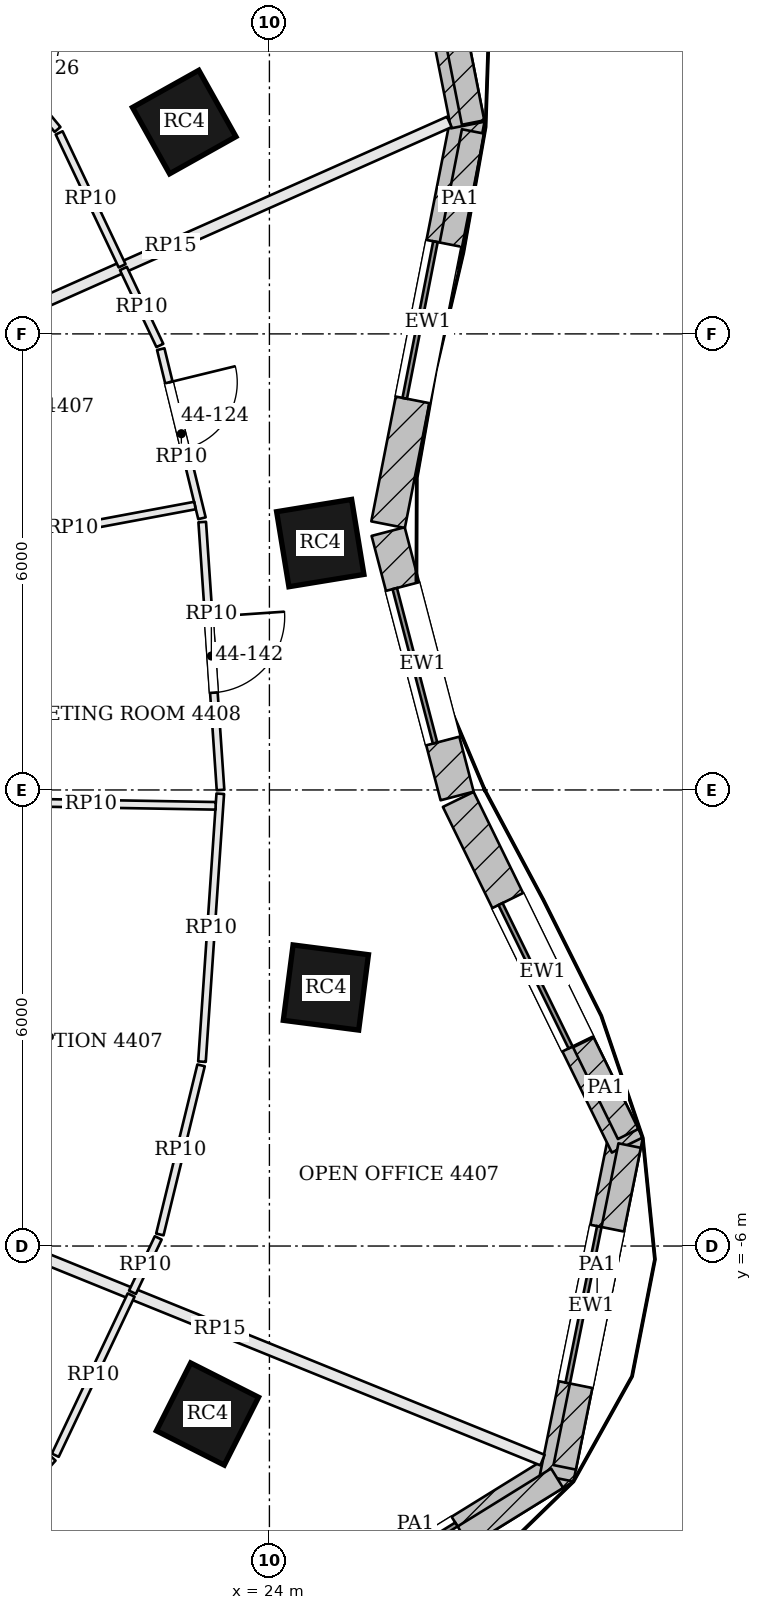
"""IFC4 building model, lengths in metres.
Left out: names, types, materials, properties, quantities, classifications, styles, units other than length and angle.
Written with IfcOpenShell. Run it as: python <this file> out.ifc"""

import sys

from ifc_helpers import new_model, si_unit, direction, frame, frame_2d, origin, origin_2d, place, context, subcontext, project, spatial, rectangle, extrude, element, fill, save


model = new_model("IFC4")
c1 = context("Model", 3, precision=1e-05, world=origin(), true_north=direction((0.0, 1.0)))
c2 = subcontext(c1, "Body", "Model", "MODEL_VIEW")
j1 = project(units=[si_unit("LENGTHUNIT", "METRE"), si_unit("PLANEANGLEUNIT", "RADIAN")], contexts=[c1])
p1 = place(None, origin())
s1 = spatial("IfcSite", under=j1, at=p1, CompositionType="ELEMENT")
p2 = place(p1, origin())
s2 = spatial("IfcBuilding", under=s1, at=p2, CompositionType="ELEMENT")
p3 = place(p2, frame((0.0, 0.0, 181.8)))
s3 = spatial("IfcBuildingStorey", under=s2, at=p3, CompositionType="ELEMENT", Elevation=181.8)
for number, where, z_axis, x_axis in (
    (1, (24.669, 3.248, 0.0), (0.0, 0.0, 1.0), (-0.162, 0.987, 0.0)),
    (2, (22.879, 8.787, 0.0), (0.0, 0.0, 1.0), (-0.489, 0.873, 0.0)),
    (3, (23.185, -8.21, 0.0), (0.0, 0.0, 1.0), (0.451, 0.893, 0.0)),
    (4, (24.743, -2.599, 0.0), (0.0, 0.0, 1.0), (0.128, 0.992, 0.0)),
):
    element("IfcColumn", number, at=place(p3, frame(where, z_axis=z_axis, x_axis=x_axis)), inside=s3, PredefinedType="COLUMN", context=c2, shape_type="SweptSolid", body=[
        extrude(rectangle(XDim=1.0, YDim=1.0, at=origin_2d()), origin(), (0.0, 0.0, 1.0), 3.9),
    ])
p4 = place(p3, frame((26.469, -0.079, 0.0), z_axis=(0.0, 0.0, 1.0), x_axis=(-0.252446779859, 0.967610780913, 0.0)))
e5 = element("IfcWall", 5, at=p4, inside=s3, PredefinedType="SOLIDWALL", context=c2, shape_type="SweptSolid", body=[
    extrude(rectangle(XDim=3.595, YDim=0.45, at=frame_2d((1.797, 0.0))), origin(), (0.0, 0.0, 1.0), 3.7),
])
p5 = place(p4, frame((0.747, 0.0, 0.9)))
e6 = element("IfcOpeningElement", 6, at=p5, cuts=e5, PredefinedType="OPENING", context=c2, shape_type="SweptSolid", body=[
    extrude(rectangle(XDim=2.1, YDim=2.3, at=frame_2d((1.05, 1.15))), frame((0.0, 0.235, 0.0), z_axis=(0.0, -1.0, 0.0), x_axis=(1.0, 0.0, 0.0)), (0.0, 0.0, 1.0), 0.47),
])
p6 = place(p3, frame((25.561, 3.49, 0.0), z_axis=(0.0, 0.0, 1.0), x_axis=(0.192494026297, 0.981298145234, 0.0)))
e7 = element("IfcWall", 7, at=p6, inside=s3, PredefinedType="SOLIDWALL", context=c2, shape_type="SweptSolid", body=[
    extrude(rectangle(XDim=5.446, YDim=0.45, at=frame_2d((2.723, 0.0))), origin(), (0.0, 0.0, 1.0), 3.7),
])
p7 = place(p6, frame((1.673, 0.0, 0.9)))
e8 = element("IfcOpeningElement", 8, at=p7, cuts=e7, PredefinedType="OPENING", context=c2, shape_type="SweptSolid", body=[
    extrude(rectangle(XDim=2.1, YDim=2.3, at=frame_2d((1.05, 1.15))), frame((0.0, 0.235, 0.0), z_axis=(0.0, -1.0, 0.0), x_axis=(1.0, 0.0, 0.0)), (0.0, 0.0, 1.0), 0.47),
])
p8 = place(p3, frame((26.61, 8.748, 0.0), z_axis=(0.0, 0.0, 1.0), x_axis=(-0.193923166402, 0.981016720312, 0.0)))
e9 = element("IfcWall", 9, at=p8, inside=s3, PredefinedType="SOLIDWALL", context=c2, shape_type="SweptSolid", body=[
    extrude(rectangle(XDim=4.518, YDim=0.45, at=frame_2d((2.259, 0.0))), origin(), (0.0, 0.0, 1.0), 3.7),
])
p9 = place(p8, frame((1.209, 0.0, 0.9)))
e10 = element("IfcOpeningElement", 10, at=p9, cuts=e9, PredefinedType="OPENING", context=c2, shape_type="SweptSolid", body=[
    extrude(rectangle(XDim=2.1, YDim=2.3, at=frame_2d((1.05, 1.15))), frame((0.0, 0.235, 0.0), z_axis=(0.0, -1.0, 0.0), x_axis=(1.0, 0.0, 0.0)), (0.0, 0.0, 1.0), 0.47),
])
p10 = place(p3, frame((23.368, -11.701, 0.0), z_axis=(0.0, 0.0, 1.0), x_axis=(0.850251408633, 0.526376806211, 0.0)))
e11 = element("IfcWall", 11, at=p10, inside=s3, PredefinedType="SOLIDWALL", context=c2, shape_type="SweptSolid", body=[
    extrude(rectangle(XDim=5.302, YDim=0.45, at=frame_2d((2.651, 0.0))), origin(), (0.0, 0.0, 1.0), 3.7),
])
p11 = place(p10, frame((1.601, 0.0, 0.9)))
e12 = element("IfcOpeningElement", 12, at=p11, cuts=e11, PredefinedType="OPENING", context=c2, shape_type="SweptSolid", body=[
    extrude(rectangle(XDim=2.1, YDim=2.3, at=frame_2d((1.05, 1.15))), frame((0.0, 0.235, 0.0), z_axis=(0.0, -1.0, 0.0), x_axis=(1.0, 0.0, 0.0)), (0.0, 0.0, 1.0), 0.47),
])
p12 = place(p3, frame((27.78, -9.053, 0.0), z_axis=(0.0, 0.0, 1.0), x_axis=(0.197796229105, 0.980243159503, 0.0)))
e13 = element("IfcWall", 13, at=p12, inside=s3, PredefinedType="SOLIDWALL", context=c2, shape_type="SweptSolid", body=[
    extrude(rectangle(XDim=4.61, YDim=0.45, at=frame_2d((2.305, 0.0))), origin(), (0.0, 0.0, 1.0), 3.7),
])
p13 = place(p12, frame((1.255, 0.0, 0.9)))
e14 = element("IfcOpeningElement", 14, at=p13, cuts=e13, PredefinedType="OPENING", context=c2, shape_type="SweptSolid", body=[
    extrude(rectangle(XDim=2.1, YDim=2.3, at=frame_2d((1.05, 1.15))), frame((0.0, 0.235, 0.0), z_axis=(0.0, -1.0, 0.0), x_axis=(1.0, 0.0, 0.0)), (0.0, 0.0, 1.0), 0.47),
])
p14 = place(p3, frame((28.707, -4.672, 0.0), z_axis=(0.0, 0.0, 1.0), x_axis=(-0.439053549989, 0.898460895221, 0.0)))
e15 = element("IfcWall", 15, at=p14, inside=s3, PredefinedType="SOLIDWALL", context=c2, shape_type="SweptSolid", body=[
    extrude(rectangle(XDim=5.062, YDim=0.45, at=frame_2d((2.531, 0.0))), origin(), (0.0, 0.0, 1.0), 3.7),
])
p15 = place(p14, frame((1.481, 0.0, 0.9)))
e16 = element("IfcOpeningElement", 16, at=p15, cuts=e15, PredefinedType="OPENING", context=c2, shape_type="SweptSolid", body=[
    extrude(rectangle(XDim=2.1, YDim=2.3, at=frame_2d((1.05, 1.15))), frame((0.0, 0.235, 0.0), z_axis=(0.0, -1.0, 0.0), x_axis=(1.0, 0.0, 0.0)), (0.0, 0.0, 1.0), 0.47),
])
p16 = place(p3, frame((26.332, 6.889, 3.9), z_axis=(0.0, 0.0, 1.0), x_axis=(0.192480725658, 0.981300754229, 0.0)))
e17 = element("IfcWall", 17, at=p16, inside=s3, PredefinedType="PARAPET", context=c2, shape_type="SweptSolid", body=[
    extrude(rectangle(XDim=1.809, YDim=0.3, at=frame_2d((0.904, 0.0))), origin(), (0.0, 0.0, 1.0), 1.1),
])
p17 = place(p3, frame((26.68, 8.78, 3.9), z_axis=(0.0, 0.0, 1.0), x_axis=(-0.193937094138, 0.981013967035, 0.0)))
e18 = element("IfcWall", 18, at=p17, inside=s3, PredefinedType="PARAPET", context=c2, shape_type="SweptSolid", body=[
    extrude(rectangle(XDim=4.332, YDim=0.3, at=frame_2d((2.166, 0.0))), origin(), (0.0, 0.0, 1.0), 1.1),
])
p18 = place(p3, frame((24.057, -11.363, 3.9), z_axis=(0.0, 0.0, 1.0), x_axis=(0.85023666639, 0.526400618471, 0.0)))
e19 = element("IfcWall", 19, at=p18, inside=s3, PredefinedType="PARAPET", context=c2, shape_type="SweptSolid", body=[
    extrude(rectangle(XDim=4.385, YDim=0.3, at=frame_2d((2.192, 0.0))), origin(), (0.0, 0.0, 1.0), 1.1),
])
p19 = place(p3, frame((27.885, -8.912, 3.9), z_axis=(0.0, 0.0, 1.0), x_axis=(0.197855213088, 0.980231255701, 0.0)))
e20 = element("IfcWall", 20, at=p19, inside=s3, PredefinedType="PARAPET", context=c2, shape_type="SweptSolid", body=[
    extrude(rectangle(XDim=4.319, YDim=0.3, at=frame_2d((2.159, 0.0))), origin(), (0.0, 0.0, 1.0), 1.1),
])
p20 = place(p3, frame((28.719, -4.526, 3.9), z_axis=(0.0, 0.0, 1.0), x_axis=(-0.439122076977, 0.898427404697, 0.0)))
e21 = element("IfcWall", 21, at=p20, inside=s3, PredefinedType="PARAPET", context=c2, shape_type="SweptSolid", body=[
    extrude(rectangle(XDim=1.343, YDim=0.3, at=frame_2d((0.671, 0.0))), origin(), (0.0, 0.0, 1.0), 1.1),
])
p21 = place(p3, frame((21.493, 15.114, 0.0), z_axis=(0.0, 0.0, 1.0), x_axis=(-0.659778549164, -0.751460089467, 0.0)))
e22 = element("IfcWall", 22, at=p21, inside=s3, PredefinedType="PARTITIONING", context=c2, shape_type="SweptSolid", body=[
    extrude(rectangle(XDim=7.877, YDim=0.15, at=frame_2d((3.938, 0.0))), origin(), (0.0, 0.0, 1.0), 3.234),
])
p22 = place(p3, frame((27.593, -8.816, 0.0), z_axis=(0.0, 0.0, 1.0), x_axis=(-0.9267854071, 0.375591279433, 0.0)))
e23 = element("IfcWall", 23, at=p22, inside=s3, PredefinedType="PARTITIONING", context=c2, shape_type="SweptSolid", body=[
    extrude(rectangle(XDim=9.161, YDim=0.15, at=frame_2d((4.58, 0.0))), origin(), (0.0, 0.0, 1.0), 3.234),
])
p23 = place(p3, frame((26.367, 8.789, 0.0), z_axis=(0.0, 0.0, 1.0), x_axis=(-0.913673557468, -0.406448804137, 0.0)))
e24 = element("IfcWall", 24, at=p23, inside=s3, PredefinedType="PARTITIONING", context=c2, shape_type="SweptSolid", body=[
    extrude(rectangle(XDim=8.029, YDim=0.15, at=frame_2d((4.014, 0.0))), origin(), (0.0, 0.0, 1.0), 3.234),
])
p24 = place(p3, frame((22.181, -6.645, 0.0), z_axis=(0.0, 0.0, 1.0), x_axis=(-0.428144841987, -0.903710127353, 0.0)))
e25 = element("IfcWall", 25, at=p24, inside=s3, PredefinedType="PARTITIONING", context=c2, shape_type="SweptSolid", body=[
    extrude(rectangle(XDim=2.332, YDim=0.1, at=frame_2d((1.166, 0.0))), origin(), (0.0, 0.0, 1.0), 3.084),
])
p25 = place(p3, frame((21.149, -8.789, 0.0), z_axis=(0.0, 0.0, 1.0), x_axis=(-0.666915902537, -0.745132994132, 0.0)))
e26 = element("IfcWall", 26, at=p25, inside=s3, PredefinedType="PARTITIONING", context=c2, shape_type="SweptSolid", body=[
    extrude(rectangle(XDim=4.186, YDim=0.1, at=frame_2d((2.093, 0.0))), origin(), (0.0, 0.0, 1.0), 3.084),
])
p26 = place(p25, frame((1.869, 0.0, 0.0)))
e27 = element("IfcOpeningElement", 27, at=p26, cuts=e26, PredefinedType="OPENING", context=c2, shape_type="SweptSolid", body=[
    extrude(rectangle(XDim=0.9, YDim=2.1, at=frame_2d((0.45, 1.05))), frame((0.0, 0.06, 0.0), z_axis=(0.0, -1.0, 0.0), x_axis=(1.0, 0.0, 0.0)), (0.0, 0.0, 1.0), 0.12),
])
p27 = place(p3, frame((22.079, 6.86, 0.0), z_axis=(0.0, 0.0, 1.0), x_axis=(0.428105084675, -0.903728961844, 0.0)))
e28 = element("IfcWall", 28, at=p27, inside=s3, PredefinedType="PARTITIONING", context=c2, shape_type="SweptSolid", body=[
    extrude(rectangle(XDim=1.12, YDim=0.1, at=frame_2d((0.56, 0.0))), origin(), (0.0, 0.0, 1.0), 3.084),
])
p28 = place(p3, frame((22.57, 5.799, 0.0), z_axis=(0.0, 0.0, 1.0), x_axis=(0.236811358433, -0.971555649727, 0.0)))
e29 = element("IfcWall", 29, at=p28, inside=s3, PredefinedType="PARTITIONING", context=c2, shape_type="SweptSolid", body=[
    extrude(rectangle(XDim=2.29, YDim=0.1, at=frame_2d((1.145, 0.0))), origin(), (0.0, 0.0, 1.0), 3.084),
])
p29 = place(p28, frame((0.45, 0.0, 0.0)))
e30 = element("IfcOpeningElement", 30, at=p29, cuts=e29, PredefinedType="OPENING", context=c2, shape_type="SweptSolid", body=[
    extrude(rectangle(XDim=0.9, YDim=2.1, at=frame_2d((0.45, 1.05))), frame((0.0, 0.06, 0.0), z_axis=(0.0, -1.0, 0.0), x_axis=(1.0, 0.0, 0.0)), (0.0, 0.0, 1.0), 0.12),
])
p30 = place(p3, frame((23.116, 3.525, 0.0), z_axis=(0.0, 0.0, 1.0), x_axis=(0.068138009452, -0.997675905125, 0.0)))
e31 = element("IfcWall", 31, at=p30, inside=s3, PredefinedType="PARTITIONING", context=c2, shape_type="SweptSolid", body=[
    extrude(rectangle(XDim=3.533, YDim=0.1, at=frame_2d((1.767, 0.0))), origin(), (0.0, 0.0, 1.0), 3.084),
])
p31 = place(p30, frame((1.25, 0.0, 0.0)))
e32 = element("IfcOpeningElement", 32, at=p31, cuts=e31, PredefinedType="OPENING", context=c2, shape_type="SweptSolid", body=[
    extrude(rectangle(XDim=1.0, YDim=2.4, at=frame_2d((0.5, 1.2))), frame((0.0, 0.06, 0.0), z_axis=(0.0, -1.0, 0.0), x_axis=(1.0, 0.0, 0.0)), (0.0, 0.0, 1.0), 0.12),
])
p32 = place(p3, frame((23.354, -0.05, 0.0), z_axis=(0.0, 0.0, 1.0), x_axis=(-0.06820679361, -0.99767120501, 0.0)))
e33 = element("IfcWall", 33, at=p32, inside=s3, PredefinedType="PARTITIONING", context=c2, shape_type="SweptSolid", body=[
    extrude(rectangle(XDim=3.533, YDim=0.1, at=frame_2d((1.767, 0.0))), origin(), (0.0, 0.0, 1.0), 3.084),
])
p33 = place(p3, frame((23.101, -3.623, 0.0), z_axis=(0.0, 0.0, 1.0), x_axis=(-0.236811358433, -0.971555649727, 0.0)))
e34 = element("IfcWall", 34, at=p33, inside=s3, PredefinedType="PARTITIONING", context=c2, shape_type="SweptSolid", body=[
    extrude(rectangle(XDim=2.29, YDim=0.1, at=frame_2d((1.145, 0.0))), origin(), (0.0, 0.0, 1.0), 3.084),
])
p34 = place(p3, frame((22.537, -5.893, 0.0), z_axis=(0.0, 0.0, 1.0), x_axis=(-0.427993557618, -0.903781784856, 0.0)))
e35 = element("IfcWall", 35, at=p34, inside=s3, PredefinedType="PARTITIONING", context=c2, shape_type="SweptSolid", body=[
    extrude(rectangle(XDim=0.792, YDim=0.1, at=frame_2d((0.396, 0.0))), origin(), (0.0, 0.0, 1.0), 3.084),
])
p35 = place(p3, frame((20.013, -0.153, 0.0), z_axis=(0.0, 0.0, 1.0), x_axis=(0.999854678593, -0.017047630214, 0.0)))
e36 = element("IfcWall", 36, at=p35, inside=s3, PredefinedType="PARTITIONING", context=c2, shape_type="SweptSolid", body=[
    extrude(rectangle(XDim=3.28, YDim=0.1, at=frame_2d((1.64, 0.0))), origin(), (0.0, 0.0, 1.0), 3.084),
])
p36 = place(p3, frame((19.796, 3.14, 0.0), z_axis=(0.0, 0.0, 1.0), x_axis=(0.983010938824, 0.183546980778, 0.0)))
e37 = element("IfcWall", 37, at=p36, inside=s3, PredefinedType="PARTITIONING", context=c2, shape_type="SweptSolid", body=[
    extrude(rectangle(XDim=3.28, YDim=0.1, at=frame_2d((1.64, 0.0))), origin(), (0.0, 0.0, 1.0), 3.084),
])
p37 = place(p3, frame((19.206, 11.121, 0.0), z_axis=(0.0, 0.0, 1.0), x_axis=(0.636597206989, -0.771196470462, 0.0)))
e38 = element("IfcWall", 38, at=p37, inside=s3, PredefinedType="PARTITIONING", context=c2, shape_type="SweptSolid", body=[
    extrude(rectangle(XDim=3.152, YDim=0.1, at=frame_2d((1.576, 0.0))), origin(), (0.0, 0.0, 1.0), 3.084),
])
p38 = place(p37, frame((1.619, 0.0, 0.0)))
e39 = element("IfcOpeningElement", 39, at=p38, cuts=e38, PredefinedType="OPENING", context=c2, shape_type="SweptSolid", body=[
    extrude(rectangle(XDim=1.0, YDim=2.1, at=frame_2d((0.5, 1.05))), frame((0.0, 0.06, 0.0), z_axis=(0.0, -1.0, 0.0), x_axis=(1.0, 0.0, 0.0)), (0.0, 0.0, 1.0), 0.12),
])
p39 = place(p3, frame((21.234, 8.644, 0.0), z_axis=(0.0, 0.0, 1.0), x_axis=(0.428183987328, -0.903691580682, 0.0)))
e40 = element("IfcWall", 40, at=p39, inside=s3, PredefinedType="PARTITIONING", context=c2, shape_type="SweptSolid", body=[
    extrude(rectangle(XDim=1.935, YDim=0.1, at=frame_2d((0.967, 0.0))), origin(), (0.0, 0.0, 1.0), 3.084),
])
p40 = place(p5, origin())
e41 = element("IfcWindow", 41, at=p40, inside=s3, PartitioningType="SINGLE_PANEL", PredefinedType="WINDOW", context=c2, shape_type="SweptSolid", body=[
    extrude(rectangle(XDim=2.1, YDim=2.3, at=frame_2d((1.05, 1.15))), frame((0.0, 0.135, 0.0), z_axis=(0.0, -1.0, 0.0), x_axis=(1.0, 0.0, 0.0)), (0.0, 0.0, 1.0), 0.06),
])
fill(e6, e41)
p41 = place(p7, origin())
e42 = element("IfcWindow", 42, at=p41, inside=s3, PartitioningType="SINGLE_PANEL", PredefinedType="WINDOW", context=c2, shape_type="SweptSolid", body=[
    extrude(rectangle(XDim=2.1, YDim=2.3, at=frame_2d((1.05, 1.15))), frame((0.0, 0.135, 0.0), z_axis=(0.0, -1.0, 0.0), x_axis=(1.0, 0.0, 0.0)), (0.0, 0.0, 1.0), 0.06),
])
fill(e8, e42)
p42 = place(p11, origin())
e43 = element("IfcWindow", 43, at=p42, inside=s3, PartitioningType="SINGLE_PANEL", PredefinedType="WINDOW", context=c2, shape_type="SweptSolid", body=[
    extrude(rectangle(XDim=2.1, YDim=2.3, at=frame_2d((1.05, 1.15))), frame((0.0, 0.135, 0.0), z_axis=(0.0, -1.0, 0.0), x_axis=(1.0, 0.0, 0.0)), (0.0, 0.0, 1.0), 0.06),
])
fill(e12, e43)
p43 = place(p13, origin())
e44 = element("IfcWindow", 44, at=p43, inside=s3, PartitioningType="SINGLE_PANEL", PredefinedType="WINDOW", context=c2, shape_type="SweptSolid", body=[
    extrude(rectangle(XDim=2.1, YDim=2.3, at=frame_2d((1.05, 1.15))), frame((0.0, 0.135, 0.0), z_axis=(0.0, -1.0, 0.0), x_axis=(1.0, 0.0, 0.0)), (0.0, 0.0, 1.0), 0.06),
])
fill(e14, e44)
p44 = place(p15, origin())
e45 = element("IfcWindow", 45, at=p44, inside=s3, PartitioningType="SINGLE_PANEL", PredefinedType="WINDOW", context=c2, shape_type="SweptSolid", body=[
    extrude(rectangle(XDim=2.1, YDim=2.3, at=frame_2d((1.05, 1.15))), frame((0.0, 0.135, 0.0), z_axis=(0.0, -1.0, 0.0), x_axis=(1.0, 0.0, 0.0)), (0.0, 0.0, 1.0), 0.06),
])
fill(e16, e45)
p45 = place(p29, origin())
e46 = element("IfcDoor", 46, at=p45, inside=s3, OperationType="SINGLE_SWING_LEFT", PredefinedType="DOOR", context=c2, shape_type="SweptSolid", body=[
    extrude(rectangle(XDim=0.9, YDim=2.1, at=frame_2d((0.45, 1.05))), frame((0.0, 0.025, 0.0), z_axis=(0.0, -1.0, 0.0), x_axis=(1.0, 0.0, 0.0)), (0.0, 0.0, 1.0), 0.05),
])
fill(e30, e46)
p46 = place(p31, origin())
e47 = element("IfcDoor", 47, at=p46, inside=s3, OperationType="SINGLE_SWING_LEFT", PredefinedType="DOOR", context=c2, shape_type="SweptSolid", body=[
    extrude(rectangle(XDim=1.0, YDim=2.4, at=frame_2d((0.5, 1.2))), frame((0.0, 0.025, 0.0), z_axis=(0.0, -1.0, 0.0), x_axis=(1.0, 0.0, 0.0)), (0.0, 0.0, 1.0), 0.05),
])
fill(e32, e47)
save(model, sys.argv[1])
